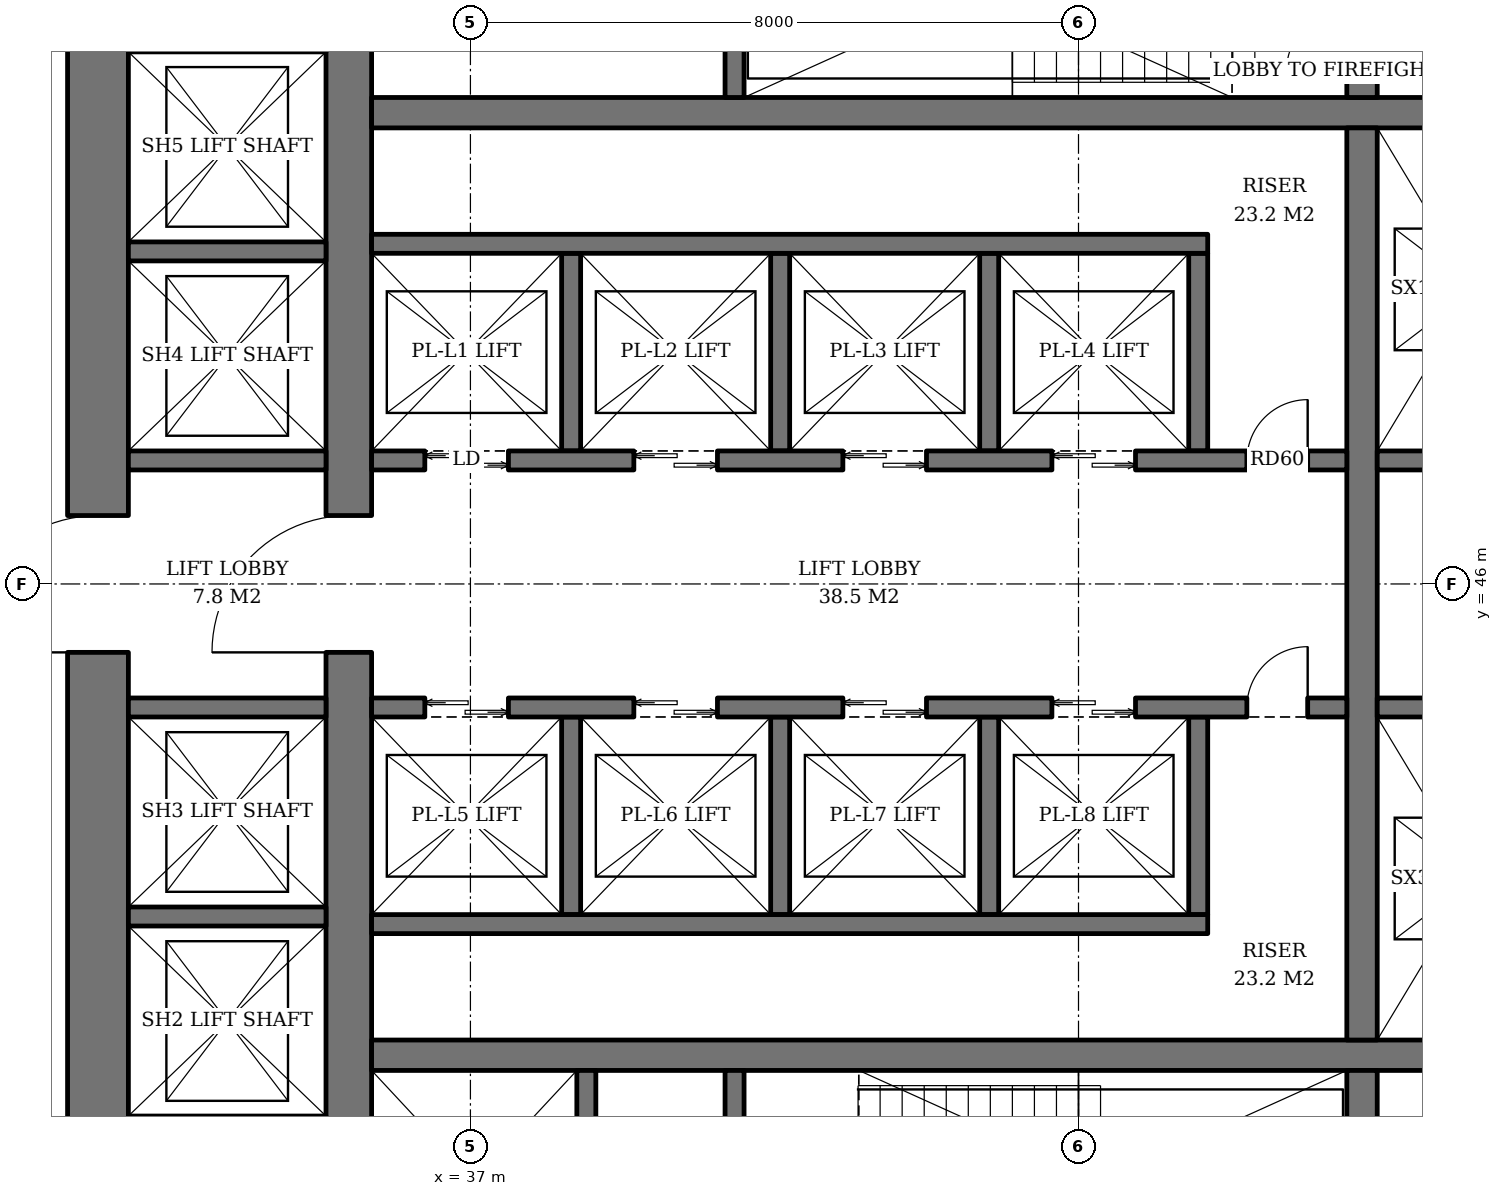
"""IFC4 building model, lengths in metres.
Left out: names, types, materials, properties, quantities, classifications, styles, units other than length and angle.
Written with IfcOpenShell. Run it as: python <this file> out.ifc"""

import sys

from ifc_helpers import new_model, si_unit, direction, frame, frame_2d, origin, place, context, subcontext, project, spatial, rectangle, extrude, element, fill, save


model = new_model("IFC4")
c1 = context("Model", 3, precision=1e-05, world=origin(), true_north=direction((0.0, 1.0)))
c2 = subcontext(c1, "Body", "Model", "MODEL_VIEW")
j1 = project(units=[si_unit("LENGTHUNIT", "METRE"), si_unit("PLANEANGLEUNIT", "RADIAN")], contexts=[c1])
p1 = place(None, origin())
s1 = spatial("IfcSite", under=j1, at=p1, CompositionType="ELEMENT")
p2 = place(p1, origin())
s2 = spatial("IfcBuilding", under=s1, at=p2, CompositionType="ELEMENT")
p3 = place(p2, frame((0.0, 0.0, 47.6)))
s3 = spatial("IfcBuildingStorey", under=s2, at=p3, CompositionType="ELEMENT", Elevation=47.6)
p4 = place(p3, frame((35.4, 36.7, 0.0), z_axis=(0.0, 0.0, 1.0), x_axis=(0.0, 1.0, 0.0)))
e1 = element("IfcWall", 1, at=p4, inside=s3, PredefinedType="SHEAR", context=c2, shape_type="SweptSolid", body=[
    extrude(rectangle(XDim=18.6, YDim=0.6, at=frame_2d((9.3, 0.0))), origin(), (0.0, 0.0, 1.0), 3.8),
])
p5 = place(p4, frame((8.4, 0.0, 0.0)))
e2 = element("IfcOpeningElement", 2, at=p5, cuts=e1, PredefinedType="OPENING", context=c2, shape_type="SweptSolid", body=[
    extrude(rectangle(XDim=1.8, YDim=2.4, at=frame_2d((0.9, 1.2))), frame((0.0, 0.31, 0.0), z_axis=(0.0, -1.0, 0.0), x_axis=(1.0, 0.0, 0.0)), (0.0, 0.0, 1.0), 0.62),
])
p6 = place(p3, frame((32.1, 33.5, 0.0), z_axis=(0.0, 0.0, 1.0), x_axis=(0.0, 1.0, 0.0)))
e3 = element("IfcWall", 3, at=p6, inside=s3, PredefinedType="SHEAR", context=c2, shape_type="SweptSolid", body=[
    extrude(rectangle(XDim=25.0, YDim=0.8, at=frame_2d((12.5, 0.0))), origin(), (0.0, 0.0, 1.0), 3.8),
])
p7 = place(p6, frame((11.6, 0.0, 0.0)))
e4 = element("IfcOpeningElement", 4, at=p7, cuts=e3, PredefinedType="OPENING", context=c2, shape_type="SweptSolid", body=[
    extrude(rectangle(XDim=1.8, YDim=2.4, at=frame_2d((0.9, 1.2))), frame((0.0, 0.41, 0.0), z_axis=(0.0, -1.0, 0.0), x_axis=(1.0, 0.0, 0.0)), (0.0, 0.0, 1.0), 0.82),
])
for number, where, z_axis, x_axis in (
    (5, (35.7, 39.8, 0.0), (0.0, 0.0, 1.0), (1.0, 0.0, 0.0)),
    (6, (35.7, 52.2, 0.0), (0.0, 0.0, 1.0), (1.0, 0.0, 0.0)),
):
    element("IfcWall", number, at=place(p3, frame(where, z_axis=z_axis, x_axis=x_axis)), inside=s3, PredefinedType="SHEAR", context=c2, shape_type="SweptSolid", body=[
        extrude(rectangle(XDim=18.6, YDim=0.4, at=frame_2d((9.3, 0.0))), origin(), (0.0, 0.0, 1.0), 3.8),
    ])
p8 = place(p3, frame((48.73, 36.7, 0.0), z_axis=(0.0, 0.0, 1.0), x_axis=(0.0, 1.0, 0.0)))
e7 = element("IfcWall", 7, at=p8, inside=s3, PredefinedType="SHEAR", context=c2, shape_type="SweptSolid", body=[
    extrude(rectangle(XDim=2.9, YDim=0.4, at=frame_2d((1.45, 0.0))), origin(), (0.0, 0.0, 1.0), 3.8),
])
p9 = place(p3, frame((48.73, 40.0, 0.0), z_axis=(0.0, 0.0, 1.0), x_axis=(0.0, 1.0, 0.0)))
e8 = element("IfcWall", 8, at=p9, inside=s3, PredefinedType="SHEAR", context=c2, shape_type="SweptSolid", body=[
    extrude(rectangle(XDim=12.0, YDim=0.4, at=frame_2d((6.0, 0.0))), origin(), (0.0, 0.0, 1.0), 3.8),
])
p10 = place(p3, frame((48.73, 52.4, 0.0), z_axis=(0.0, 0.0, 1.0), x_axis=(0.0, 1.0, 0.0)))
e9 = element("IfcWall", 9, at=p10, inside=s3, PredefinedType="SHEAR", context=c2, shape_type="SweptSolid", body=[
    extrude(rectangle(XDim=2.9, YDim=0.4, at=frame_2d((1.45, 0.0))), origin(), (0.0, 0.0, 1.0), 3.8),
])
p11 = place(p10, frame((0.3, 0.0, 0.0)))
e10 = element("IfcOpeningElement", 10, at=p11, cuts=e9, PredefinedType="OPENING", context=c2, shape_type="SweptSolid", body=[
    extrude(rectangle(XDim=1.0, YDim=2.1, at=frame_2d((0.5, 1.05))), frame((0.0, 0.21, 0.0), z_axis=(0.0, -1.0, 0.0), x_axis=(1.0, 0.0, 0.0)), (0.0, 0.0, 1.0), 0.42),
])
p12 = place(p3, frame((38.525, 36.7, 0.0), z_axis=(0.0, 0.0, 1.0), x_axis=(0.0, 1.0, 0.0)))
e11 = element("IfcWall", 11, at=p12, inside=s3, PredefinedType="SHEAR", context=c2, shape_type="SweptSolid", body=[
    extrude(rectangle(XDim=2.9, YDim=0.25, at=frame_2d((1.45, 0.0))), origin(), (0.0, 0.0, 1.0), 3.8),
])
p13 = place(p12, frame((0.8, 0.0, 0.0)))
e12 = element("IfcOpeningElement", 12, at=p13, cuts=e11, PredefinedType="OPENING", context=c2, shape_type="SweptSolid", body=[
    extrude(rectangle(XDim=1.3, YDim=2.2, at=frame_2d((0.65, 1.1))), frame((0.0, 0.135, 0.0), z_axis=(0.0, -1.0, 0.0), x_axis=(1.0, 0.0, 0.0)), (0.0, 0.0, 1.0), 0.27),
])
p14 = place(p3, frame((40.475, 36.7, 0.0), z_axis=(0.0, 0.0, 1.0), x_axis=(0.0, 1.0, 0.0)))
e13 = element("IfcWall", 13, at=p14, inside=s3, PredefinedType="SHEAR", context=c2, shape_type="SweptSolid", body=[
    extrude(rectangle(XDim=2.9, YDim=0.25, at=frame_2d((1.45, 0.0))), origin(), (0.0, 0.0, 1.0), 3.8),
])
p15 = place(p14, frame((0.75, 0.0, 0.0)))
e14 = element("IfcOpeningElement", 14, at=p15, cuts=e13, PredefinedType="OPENING", context=c2, shape_type="SweptSolid", body=[
    extrude(rectangle(XDim=1.2, YDim=2.1, at=frame_2d((0.6, 1.05))), frame((0.0, 0.135, 0.0), z_axis=(0.0, -1.0, 0.0), x_axis=(1.0, 0.0, 0.0)), (0.0, 0.0, 1.0), 0.27),
])
p16 = place(p3, frame((40.475, 52.4, 0.0), z_axis=(0.0, 0.0, 1.0), x_axis=(0.0, 1.0, 0.0)))
e15 = element("IfcWall", 15, at=p16, inside=s3, PredefinedType="SHEAR", context=c2, shape_type="SweptSolid", body=[
    extrude(rectangle(XDim=2.9, YDim=0.25, at=frame_2d((1.45, 0.0))), origin(), (0.0, 0.0, 1.0), 3.8),
])
for number, where, z_axis, x_axis in (
    (16, (38.325, 47.75, 0.0), (0.0, 0.0, 1.0), (0.0, 1.0, 0.0)),
    (17, (41.075, 47.75, 0.0), (0.0, 0.0, 1.0), (0.0, 1.0, 0.0)),
    (18, (43.825, 47.75, 0.0), (0.0, 0.0, 1.0), (0.0, 1.0, 0.0)),
    (19, (46.575, 47.75, 0.0), (0.0, 0.0, 1.0), (0.0, 1.0, 0.0)),
):
    element("IfcWall", number, at=place(p3, frame(where, z_axis=z_axis, x_axis=x_axis)), inside=s3, PredefinedType="SHEAR", context=c2, shape_type="SweptSolid", body=[
        extrude(rectangle(XDim=2.6, YDim=0.25, at=frame_2d((1.3, 0.0))), origin(), (0.0, 0.0, 1.0), 3.8),
    ])
p17 = place(p3, frame((35.7, 50.475, 0.0), z_axis=(0.0, 0.0, 1.0), x_axis=(1.0, 0.0, 0.0)))
e20 = element("IfcWall", 20, at=p17, inside=s3, PredefinedType="SHEAR", context=c2, shape_type="SweptSolid", body=[
    extrude(rectangle(XDim=11.0, YDim=0.25, at=frame_2d((5.5, 0.0))), origin(), (0.0, 0.0, 1.0), 3.8),
])
p18 = place(p3, frame((35.7, 47.625, 0.0), z_axis=(0.0, 0.0, 1.0), x_axis=(1.0, 0.0, 0.0)))
e21 = element("IfcWall", 21, at=p18, inside=s3, PredefinedType="SHEAR", context=c2, shape_type="SweptSolid", body=[
    extrude(rectangle(XDim=12.83, YDim=0.25, at=frame_2d((6.415, 0.0))), origin(), (0.0, 0.0, 1.0), 3.8),
])
p19 = place(p18, frame((0.7, 0.0, 0.0)))
e22 = element("IfcOpeningElement", 22, at=p19, cuts=e21, PredefinedType="OPENING", context=c2, shape_type="SweptSolid", body=[
    extrude(rectangle(XDim=1.1, YDim=2.2, at=frame_2d((0.55, 1.1))), frame((0.0, 0.135, 0.0), z_axis=(0.0, -1.0, 0.0), x_axis=(1.0, 0.0, 0.0)), (0.0, 0.0, 1.0), 0.27),
])
p20 = place(p18, frame((3.45, 0.0, 0.0)))
e23 = element("IfcOpeningElement", 23, at=p20, cuts=e21, PredefinedType="OPENING", context=c2, shape_type="SweptSolid", body=[
    extrude(rectangle(XDim=1.1, YDim=2.2, at=frame_2d((0.55, 1.1))), frame((0.0, 0.135, 0.0), z_axis=(0.0, -1.0, 0.0), x_axis=(1.0, 0.0, 0.0)), (0.0, 0.0, 1.0), 0.27),
])
p21 = place(p18, frame((6.2, 0.0, 0.0)))
e24 = element("IfcOpeningElement", 24, at=p21, cuts=e21, PredefinedType="OPENING", context=c2, shape_type="SweptSolid", body=[
    extrude(rectangle(XDim=1.1, YDim=2.2, at=frame_2d((0.55, 1.1))), frame((0.0, 0.135, 0.0), z_axis=(0.0, -1.0, 0.0), x_axis=(1.0, 0.0, 0.0)), (0.0, 0.0, 1.0), 0.27),
])
p22 = place(p18, frame((8.95, 0.0, 0.0)))
e25 = element("IfcOpeningElement", 25, at=p22, cuts=e21, PredefinedType="OPENING", context=c2, shape_type="SweptSolid", body=[
    extrude(rectangle(XDim=1.1, YDim=2.2, at=frame_2d((0.55, 1.1))), frame((0.0, 0.135, 0.0), z_axis=(0.0, -1.0, 0.0), x_axis=(1.0, 0.0, 0.0)), (0.0, 0.0, 1.0), 0.27),
])
p23 = place(p18, frame((11.515, 0.0, 0.0)))
e26 = element("IfcOpeningElement", 26, at=p23, cuts=e21, PredefinedType="OPENING", context=c2, shape_type="SweptSolid", body=[
    extrude(rectangle(XDim=0.8, YDim=2.0, at=frame_2d((0.4, 1.0))), frame((0.0, 0.135, 0.0), z_axis=(0.0, -1.0, 0.0), x_axis=(1.0, 0.0, 0.0)), (0.0, 0.0, 1.0), 0.27),
])
for number, where, z_axis, x_axis in (
    (27, (38.325, 44.25, 0.0), (0.0, 0.0, 1.0), (0.0, -1.0, 0.0)),
    (28, (41.075, 44.25, 0.0), (0.0, 0.0, 1.0), (0.0, -1.0, 0.0)),
    (29, (43.825, 44.25, 0.0), (0.0, 0.0, 1.0), (0.0, -1.0, 0.0)),
    (30, (46.575, 44.25, 0.0), (0.0, 0.0, 1.0), (0.0, -1.0, 0.0)),
):
    element("IfcWall", number, at=place(p3, frame(where, z_axis=z_axis, x_axis=x_axis)), inside=s3, PredefinedType="SHEAR", context=c2, shape_type="SweptSolid", body=[
        extrude(rectangle(XDim=2.6, YDim=0.25, at=frame_2d((1.3, 0.0))), origin(), (0.0, 0.0, 1.0), 3.8),
    ])
p24 = place(p3, frame((35.7, 41.525, 0.0), z_axis=(0.0, 0.0, 1.0), x_axis=(1.0, 0.0, 0.0)))
e31 = element("IfcWall", 31, at=p24, inside=s3, PredefinedType="SHEAR", context=c2, shape_type="SweptSolid", body=[
    extrude(rectangle(XDim=11.0, YDim=0.25, at=frame_2d((5.5, 0.0))), origin(), (0.0, 0.0, 1.0), 3.8),
])
p25 = place(p3, frame((35.7, 44.375, 0.0), z_axis=(0.0, 0.0, 1.0), x_axis=(1.0, 0.0, 0.0)))
e32 = element("IfcWall", 32, at=p25, inside=s3, PredefinedType="SHEAR", context=c2, shape_type="SweptSolid", body=[
    extrude(rectangle(XDim=12.83, YDim=0.25, at=frame_2d((6.415, 0.0))), origin(), (0.0, 0.0, 1.0), 3.8),
])
p26 = place(p25, frame((0.7, 0.0, 0.0)))
e33 = element("IfcOpeningElement", 33, at=p26, cuts=e32, PredefinedType="OPENING", context=c2, shape_type="SweptSolid", body=[
    extrude(rectangle(XDim=1.1, YDim=2.2, at=frame_2d((0.55, 1.1))), frame((0.0, 0.135, 0.0), z_axis=(0.0, -1.0, 0.0), x_axis=(1.0, 0.0, 0.0)), (0.0, 0.0, 1.0), 0.27),
])
p27 = place(p25, frame((3.45, 0.0, 0.0)))
e34 = element("IfcOpeningElement", 34, at=p27, cuts=e32, PredefinedType="OPENING", context=c2, shape_type="SweptSolid", body=[
    extrude(rectangle(XDim=1.1, YDim=2.2, at=frame_2d((0.55, 1.1))), frame((0.0, 0.135, 0.0), z_axis=(0.0, -1.0, 0.0), x_axis=(1.0, 0.0, 0.0)), (0.0, 0.0, 1.0), 0.27),
])
p28 = place(p25, frame((6.2, 0.0, 0.0)))
e35 = element("IfcOpeningElement", 35, at=p28, cuts=e32, PredefinedType="OPENING", context=c2, shape_type="SweptSolid", body=[
    extrude(rectangle(XDim=1.1, YDim=2.2, at=frame_2d((0.55, 1.1))), frame((0.0, 0.135, 0.0), z_axis=(0.0, -1.0, 0.0), x_axis=(1.0, 0.0, 0.0)), (0.0, 0.0, 1.0), 0.27),
])
p29 = place(p25, frame((8.95, 0.0, 0.0)))
e36 = element("IfcOpeningElement", 36, at=p29, cuts=e32, PredefinedType="OPENING", context=c2, shape_type="SweptSolid", body=[
    extrude(rectangle(XDim=1.1, YDim=2.2, at=frame_2d((0.55, 1.1))), frame((0.0, 0.135, 0.0), z_axis=(0.0, -1.0, 0.0), x_axis=(1.0, 0.0, 0.0)), (0.0, 0.0, 1.0), 0.27),
])
p30 = place(p25, frame((11.515, 0.0, 0.0)))
e37 = element("IfcOpeningElement", 37, at=p30, cuts=e32, PredefinedType="OPENING", context=c2, shape_type="SweptSolid", body=[
    extrude(rectangle(XDim=0.8, YDim=2.0, at=frame_2d((0.4, 1.0))), frame((0.0, 0.135, 0.0), z_axis=(0.0, -1.0, 0.0), x_axis=(1.0, 0.0, 0.0)), (0.0, 0.0, 1.0), 0.27),
])
for number, where, z_axis, x_axis in (
    (38, (48.93, 47.625, 0.0), (0.0, 0.0, 1.0), (1.0, 0.0, 0.0)),
    (39, (48.93, 44.375, 0.0), (0.0, 0.0, 1.0), (1.0, 0.0, 0.0)),
):
    element("IfcWall", number, at=place(p3, frame(where, z_axis=z_axis, x_axis=x_axis)), inside=s3, PredefinedType="SHEAR", context=c2, shape_type="SweptSolid", body=[
        extrude(rectangle(XDim=5.37, YDim=0.25, at=frame_2d((2.685, 0.0))), origin(), (0.0, 0.0, 1.0), 3.8),
    ])
for number, where, z_axis, x_axis in (
    (40, (32.5, 41.625, 0.0), (0.0, 0.0, 1.0), (1.0, 0.0, 0.0)),
    (41, (32.5, 44.375, 0.0), (0.0, 0.0, 1.0), (1.0, 0.0, 0.0)),
    (42, (32.5, 47.625, 0.0), (0.0, 0.0, 1.0), (1.0, 0.0, 0.0)),
    (43, (32.5, 50.375, 0.0), (0.0, 0.0, 1.0), (1.0, 0.0, 0.0)),
):
    element("IfcWall", number, at=place(p3, frame(where, z_axis=z_axis, x_axis=x_axis)), inside=s3, PredefinedType="SHEAR", context=c2, shape_type="SweptSolid", body=[
        extrude(rectangle(XDim=2.6, YDim=0.25, at=frame_2d((1.3, 0.0))), origin(), (0.0, 0.0, 1.0), 3.8),
    ])
p31 = place(p19, origin())
e44 = element("IfcDoor", 44, at=p31, inside=s3, OperationType="DOUBLE_DOOR_SLIDING", PredefinedType="DOOR", context=c2, shape_type="SweptSolid", body=[
    extrude(rectangle(XDim=1.1, YDim=2.2, at=frame_2d((0.55, 1.1))), frame((0.0, 0.025, 0.0), z_axis=(0.0, -1.0, 0.0), x_axis=(1.0, 0.0, 0.0)), (0.0, 0.0, 1.0), 0.05),
])
fill(e22, e44)
p32 = place(p20, origin())
e45 = element("IfcDoor", 45, at=p32, inside=s3, OperationType="DOUBLE_DOOR_SLIDING", PredefinedType="DOOR", context=c2, shape_type="SweptSolid", body=[
    extrude(rectangle(XDim=1.1, YDim=2.2, at=frame_2d((0.55, 1.1))), frame((0.0, 0.025, 0.0), z_axis=(0.0, -1.0, 0.0), x_axis=(1.0, 0.0, 0.0)), (0.0, 0.0, 1.0), 0.05),
])
fill(e23, e45)
p33 = place(p21, origin())
e46 = element("IfcDoor", 46, at=p33, inside=s3, OperationType="DOUBLE_DOOR_SLIDING", PredefinedType="DOOR", context=c2, shape_type="SweptSolid", body=[
    extrude(rectangle(XDim=1.1, YDim=2.2, at=frame_2d((0.55, 1.1))), frame((0.0, 0.025, 0.0), z_axis=(0.0, -1.0, 0.0), x_axis=(1.0, 0.0, 0.0)), (0.0, 0.0, 1.0), 0.05),
])
fill(e24, e46)
p34 = place(p22, origin())
e47 = element("IfcDoor", 47, at=p34, inside=s3, OperationType="DOUBLE_DOOR_SLIDING", PredefinedType="DOOR", context=c2, shape_type="SweptSolid", body=[
    extrude(rectangle(XDim=1.1, YDim=2.2, at=frame_2d((0.55, 1.1))), frame((0.0, 0.025, 0.0), z_axis=(0.0, -1.0, 0.0), x_axis=(1.0, 0.0, 0.0)), (0.0, 0.0, 1.0), 0.05),
])
fill(e25, e47)
p35 = place(p23, origin())
e48 = element("IfcDoor", 48, at=p35, inside=s3, OperationType="SINGLE_SWING_RIGHT", PredefinedType="DOOR", context=c2, shape_type="SweptSolid", body=[
    extrude(rectangle(XDim=0.8, YDim=2.0, at=frame_2d((0.4, 1.0))), frame((0.0, 0.025, 0.0), z_axis=(0.0, -1.0, 0.0), x_axis=(1.0, 0.0, 0.0)), (0.0, 0.0, 1.0), 0.05),
])
fill(e26, e48)
p36 = place(p26, origin())
e49 = element("IfcDoor", 49, at=p36, inside=s3, OperationType="DOUBLE_DOOR_SLIDING", PredefinedType="DOOR", context=c2, shape_type="SweptSolid", body=[
    extrude(rectangle(XDim=1.1, YDim=2.2, at=frame_2d((0.55, 1.1))), frame((0.0, 0.025, 0.0), z_axis=(0.0, -1.0, 0.0), x_axis=(1.0, 0.0, 0.0)), (0.0, 0.0, 1.0), 0.05),
])
fill(e33, e49)
p37 = place(p27, origin())
e50 = element("IfcDoor", 50, at=p37, inside=s3, OperationType="DOUBLE_DOOR_SLIDING", PredefinedType="DOOR", context=c2, shape_type="SweptSolid", body=[
    extrude(rectangle(XDim=1.1, YDim=2.2, at=frame_2d((0.55, 1.1))), frame((0.0, 0.025, 0.0), z_axis=(0.0, -1.0, 0.0), x_axis=(1.0, 0.0, 0.0)), (0.0, 0.0, 1.0), 0.05),
])
fill(e34, e50)
p38 = place(p28, origin())
e51 = element("IfcDoor", 51, at=p38, inside=s3, OperationType="DOUBLE_DOOR_SLIDING", PredefinedType="DOOR", context=c2, shape_type="SweptSolid", body=[
    extrude(rectangle(XDim=1.1, YDim=2.2, at=frame_2d((0.55, 1.1))), frame((0.0, 0.025, 0.0), z_axis=(0.0, -1.0, 0.0), x_axis=(1.0, 0.0, 0.0)), (0.0, 0.0, 1.0), 0.05),
])
fill(e35, e51)
p39 = place(p29, origin())
e52 = element("IfcDoor", 52, at=p39, inside=s3, OperationType="DOUBLE_DOOR_SLIDING", PredefinedType="DOOR", context=c2, shape_type="SweptSolid", body=[
    extrude(rectangle(XDim=1.1, YDim=2.2, at=frame_2d((0.55, 1.1))), frame((0.0, 0.025, 0.0), z_axis=(0.0, -1.0, 0.0), x_axis=(1.0, 0.0, 0.0)), (0.0, 0.0, 1.0), 0.05),
])
fill(e36, e52)
p40 = place(p30, origin())
e53 = element("IfcDoor", 53, at=p40, inside=s3, OperationType="SINGLE_SWING_RIGHT", PredefinedType="DOOR", context=c2, shape_type="SweptSolid", body=[
    extrude(rectangle(XDim=0.8, YDim=2.0, at=frame_2d((0.4, 1.0))), frame((0.0, 0.025, 0.0), z_axis=(0.0, -1.0, 0.0), x_axis=(1.0, 0.0, 0.0)), (0.0, 0.0, 1.0), 0.05),
])
fill(e37, e53)
p41 = place(p11, origin())
e54 = element("IfcDoor", 54, at=p41, inside=s3, OperationType="SINGLE_SWING_LEFT", PredefinedType="DOOR", context=c2, shape_type="SweptSolid", body=[
    extrude(rectangle(XDim=1.0, YDim=2.1, at=frame_2d((0.5, 1.05))), frame((0.0, 0.025, 0.0), z_axis=(0.0, -1.0, 0.0), x_axis=(1.0, 0.0, 0.0)), (0.0, 0.0, 1.0), 0.05),
])
fill(e10, e54)
p42 = place(p5, origin())
e55 = element("IfcDoor", 55, at=p42, inside=s3, OperationType="DOUBLE_DOOR_SINGLE_SWING", PredefinedType="DOOR", context=c2, shape_type="SweptSolid", body=[
    extrude(rectangle(XDim=1.8, YDim=2.4, at=frame_2d((0.9, 1.2))), frame((0.0, 0.025, 0.0), z_axis=(0.0, -1.0, 0.0), x_axis=(1.0, 0.0, 0.0)), (0.0, 0.0, 1.0), 0.05),
])
fill(e2, e55)
p43 = place(p7, origin())
e56 = element("IfcDoor", 56, at=p43, inside=s3, OperationType="DOUBLE_DOOR_SINGLE_SWING", PredefinedType="DOOR", context=c2, shape_type="SweptSolid", body=[
    extrude(rectangle(XDim=1.8, YDim=2.4, at=frame_2d((0.9, 1.2))), frame((0.0, 0.025, 0.0), z_axis=(0.0, -1.0, 0.0), x_axis=(1.0, 0.0, 0.0)), (0.0, 0.0, 1.0), 0.05),
])
fill(e4, e56)
save(model, sys.argv[1])
